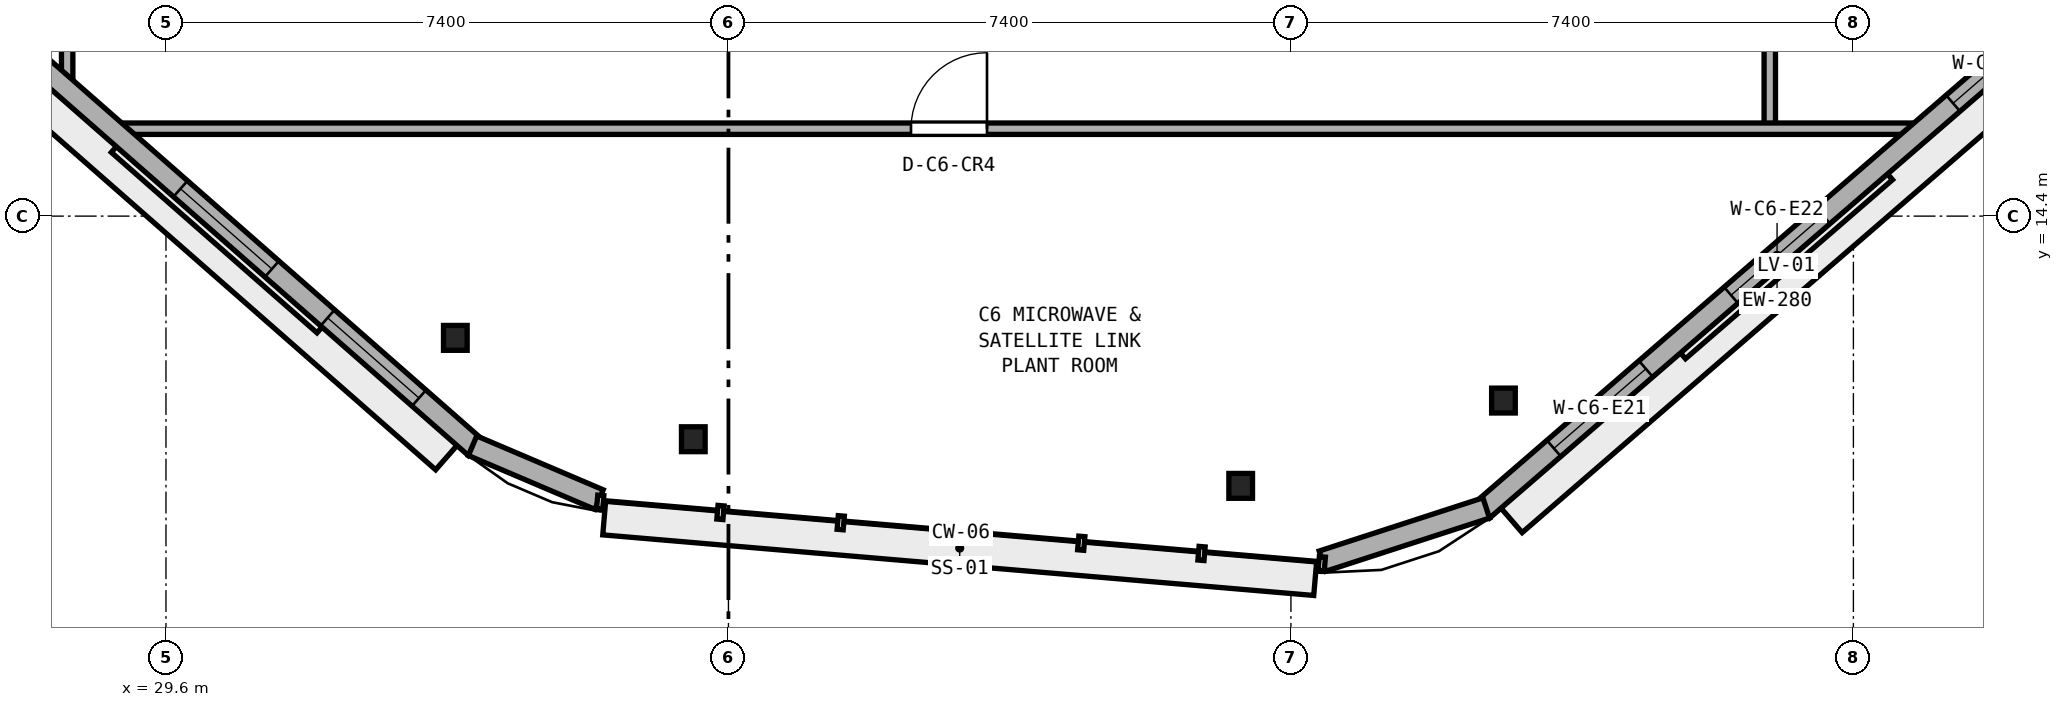
"""IFC4 building model, lengths in metres.
Left out: names, types, materials, properties, quantities, classifications, styles, units other than length and angle.
Written with IfcOpenShell. Run it as: python <this file> out.ifc"""

import sys

from ifc_helpers import new_model, si_unit, direction, frame, frame_2d, origin, origin_2d, place, context, subcontext, project, spatial, rectangle, i_section, extrude, element, fill, save


model = new_model("IFC4")
c1 = context("Model", 3, precision=1e-05, world=origin(), true_north=direction((0.0, 1.0)))
c2 = subcontext(c1, "Body", "Model", "MODEL_VIEW")
j1 = project(units=[si_unit("LENGTHUNIT", "METRE"), si_unit("PLANEANGLEUNIT", "RADIAN")], contexts=[c1])
p1 = place(None, origin())
s1 = spatial("IfcSite", under=j1, at=p1, CompositionType="ELEMENT")
p2 = place(p1, origin())
s2 = spatial("IfcBuilding", under=s1, at=p2, CompositionType="ELEMENT")
p3 = place(p2, frame((0.0, 0.0, 333.4)))
s3 = spatial("IfcBuildingStorey", under=s2, at=p3, CompositionType="ELEMENT", Elevation=333.4)
for number, where, z_axis, x_axis in (
    (1, (36.538, 11.465, 0.0), (0.0, 0.0, 1.0), (1.0, 0.0, 0.0)),
    (2, (43.739, 10.851, 0.0), (0.0, 0.0, 1.0), (1.0, 0.0, 0.0)),
    (3, (47.196, 11.973, 0.0), (0.0, 0.0, 1.0), (1.0, 0.0, 0.0)),
    (4, (33.407, 12.798, 0.0), (0.0, 0.0, 1.0), (1.0, 0.0, 0.0)),
):
    element("IfcColumn", number, at=place(p3, frame(where, z_axis=z_axis, x_axis=x_axis)), inside=s3, PredefinedType="COLUMN", context=c2, shape_type="SweptSolid", body=[
        extrude(i_section(OverallWidth=0.311, OverallDepth=0.327, WebThickness=0.016, FlangeThickness=0.025, at=origin_2d()), origin(), (0.0, 0.0, 1.0), 4.0),
    ])
p4 = place(p3, frame((50.7, 15.55, 0.0), z_axis=(0.0, 0.0, 1.0), x_axis=(0.0, 1.0, 0.0)))
e5 = element("IfcWall", 5, at=p4, inside=s3, PredefinedType="PARTITIONING", context=c2, shape_type="SweptSolid", body=[
    extrude(rectangle(XDim=19.3, YDim=0.15, at=frame_2d((9.65, 0.0))), origin(), (0.0, 0.0, 1.0), 3.7),
])
p5 = place(p4, frame((9.15, 0.0, 0.0)))
e6 = element("IfcOpeningElement", 6, at=p5, cuts=e5, PredefinedType="OPENING", context=c2, shape_type="SweptSolid", body=[
    extrude(rectangle(XDim=1.0, YDim=2.12, at=frame_2d((0.5, 1.06))), frame((0.0, 0.085, 0.0), z_axis=(0.0, -1.0, 0.0), x_axis=(1.0, 0.0, 0.0)), (0.0, 0.0, 1.0), 0.17),
])
p6 = place(p3, frame((28.3, 16.022, 0.0), z_axis=(0.0, 0.0, 1.0), x_axis=(0.0, 1.0, 0.0)))
e7 = element("IfcWall", 7, at=p6, inside=s3, PredefinedType="PARTITIONING", context=c2, shape_type="SweptSolid", body=[
    extrude(rectangle(XDim=17.933, YDim=0.15, at=frame_2d((8.967, 0.0))), origin(), (0.0, 0.0, 1.0), 3.156),
])
p7 = place(p6, frame((8.464, 0.0, 0.0)))
e8 = element("IfcOpeningElement", 8, at=p7, cuts=e7, PredefinedType="OPENING", context=c2, shape_type="SweptSolid", body=[
    extrude(rectangle(XDim=1.0, YDim=2.12, at=frame_2d((0.5, 1.06))), frame((0.0, 0.085, 0.0), z_axis=(0.0, -1.0, 0.0), x_axis=(1.0, 0.0, 0.0)), (0.0, 0.0, 1.0), 0.17),
])
p8 = place(p3, frame((28.818, 15.55, 0.0), z_axis=(0.0, 0.0, 1.0), x_axis=(1.0, 0.0, 0.0)))
e9 = element("IfcWall", 9, at=p8, inside=s3, PredefinedType="PARTITIONING", context=c2, shape_type="SweptSolid", body=[
    extrude(rectangle(XDim=23.98, YDim=0.15, at=frame_2d((11.99, 0.0))), origin(), (0.0, 0.0, 1.0), 3.7),
])
p9 = place(p8, frame((10.583, 0.0, 0.0)))
e10 = element("IfcOpeningElement", 10, at=p9, cuts=e9, PredefinedType="OPENING", context=c2, shape_type="SweptSolid", body=[
    extrude(rectangle(XDim=1.0, YDim=2.12, at=frame_2d((0.5, 1.06))), frame((0.0, 0.085, 0.0), z_axis=(0.0, -1.0, 0.0), x_axis=(1.0, 0.0, 0.0)), (0.0, 0.0, 1.0), 0.17),
])
p10 = place(p3, frame((46.921, 10.533, 0.0), z_axis=(0.0, 0.0, 1.0), x_axis=(0.756489047049, 0.654006362121, 0.0)))
e11 = element("IfcWall", 11, at=p10, inside=s3, PredefinedType="STANDARD", context=c2, shape_type="SweptSolid", body=[
    extrude(rectangle(XDim=10.244, YDim=0.28, at=frame_2d((5.122, 0.0))), origin(), (0.0, 0.0, 1.0), 3.7),
])
p11 = place(p10, frame((1.24, 0.0, 0.9)))
e12 = element("IfcOpeningElement", 12, at=p11, cuts=e11, PredefinedType="OPENING", context=c2, shape_type="SweptSolid", body=[
    extrude(rectangle(XDim=1.6, YDim=1.45, at=frame_2d((0.8, 0.725))), frame((0.0, 0.15, 0.0), z_axis=(0.0, -1.0, 0.0), x_axis=(1.0, 0.0, 0.0)), (0.0, 0.0, 1.0), 0.3),
])
p12 = place(p10, frame((4.322, 0.0, 0.9)))
e13 = element("IfcOpeningElement", 13, at=p12, cuts=e11, PredefinedType="OPENING", context=c2, shape_type="SweptSolid", body=[
    extrude(rectangle(XDim=1.6, YDim=1.45, at=frame_2d((0.8, 0.725))), frame((0.0, 0.15, 0.0), z_axis=(0.0, -1.0, 0.0), x_axis=(1.0, 0.0, 0.0)), (0.0, 0.0, 1.0), 0.3),
])
p13 = place(p10, frame((8.183, 0.0, 0.9)))
e14 = element("IfcOpeningElement", 14, at=p13, cuts=e11, PredefinedType="OPENING", context=c2, shape_type="SweptSolid", body=[
    extrude(rectangle(XDim=1.6, YDim=1.45, at=frame_2d((0.8, 0.725))), frame((0.0, 0.15, 0.0), z_axis=(0.0, -1.0, 0.0), x_axis=(1.0, 0.0, 0.0)), (0.0, 0.0, 1.0), 0.3),
])
p14 = place(p3, frame((27.114, 17.109, 0.0), z_axis=(0.0, 0.0, 1.0), x_axis=(0.751684867815, -0.659522448062, 0.0)))
e15 = element("IfcWall", 15, at=p14, inside=s3, PredefinedType="STANDARD", context=c2, shape_type="SweptSolid", body=[
    extrude(rectangle(XDim=8.723, YDim=0.28, at=frame_2d((4.362, 0.0))), origin(), (0.0, 0.0, 1.0), 3.7),
])
p15 = place(p14, frame((3.562, 0.0, 0.9)))
e16 = element("IfcOpeningElement", 16, at=p15, cuts=e15, PredefinedType="OPENING", context=c2, shape_type="SweptSolid", body=[
    extrude(rectangle(XDim=1.6, YDim=1.45, at=frame_2d((0.8, 0.725))), frame((0.0, 0.15, 0.0), z_axis=(0.0, -1.0, 0.0), x_axis=(1.0, 0.0, 0.0)), (0.0, 0.0, 1.0), 0.3),
])
p16 = place(p14, frame((6.136, 0.0, 0.9)))
e17 = element("IfcOpeningElement", 17, at=p16, cuts=e15, PredefinedType="OPENING", context=c2, shape_type="SweptSolid", body=[
    extrude(rectangle(XDim=1.6, YDim=1.45, at=frame_2d((0.8, 0.725))), frame((0.0, 0.15, 0.0), z_axis=(0.0, -1.0, 0.0), x_axis=(1.0, 0.0, 0.0)), (0.0, 0.0, 1.0), 0.3),
])
p17 = place(p3, frame((44.814, 9.861, 0.0), z_axis=(0.0, 0.0, 1.0), x_axis=(0.951121924751, 0.308815615309, 0.0)))
e18 = element("IfcWall", 18, at=p17, inside=s3, PredefinedType="STANDARD", context=c2, shape_type="SweptSolid", body=[
    extrude(rectangle(XDim=2.266, YDim=0.28, at=frame_2d((1.133, 0.0))), origin(), (0.0, 0.0, 1.0), 3.7),
])
p18 = place(p3, frame((33.634, 11.379, 0.0), z_axis=(0.0, 0.0, 1.0), x_axis=(0.920078043788, -0.391735106085, 0.0)))
e19 = element("IfcWall", 19, at=p18, inside=s3, PredefinedType="STANDARD", context=c2, shape_type="SweptSolid", body=[
    extrude(rectangle(XDim=1.809, YDim=0.28, at=frame_2d((0.904, 0.0))), origin(), (0.0, 0.0, 1.0), 3.7),
])
p19 = place(p9, origin())
e20 = element("IfcDoor", 20, at=p19, inside=s3, OperationType="SINGLE_SWING_RIGHT", PredefinedType="DOOR", context=c2, shape_type="SweptSolid", body=[
    extrude(rectangle(XDim=1.0, YDim=2.12, at=frame_2d((0.5, 1.06))), frame((0.0, 0.025, 0.0), z_axis=(0.0, -1.0, 0.0), x_axis=(1.0, 0.0, 0.0)), (0.0, 0.0, 1.0), 0.05),
])
fill(e10, e20)
p20 = place(p11, origin())
e21 = element("IfcWindow", 21, at=p20, inside=s3, PartitioningType="SINGLE_PANEL", PredefinedType="WINDOW", context=c2, shape_type="SweptSolid", body=[
    extrude(rectangle(XDim=1.6, YDim=1.45, at=frame_2d((0.8, 0.725))), frame((0.0, 0.03, 0.0), z_axis=(0.0, -1.0, 0.0), x_axis=(1.0, 0.0, 0.0)), (0.0, 0.0, 1.0), 0.06),
])
fill(e12, e21)
p21 = place(p12, origin())
e22 = element("IfcWindow", 22, at=p21, inside=s3, PartitioningType="SINGLE_PANEL", PredefinedType="WINDOW", context=c2, shape_type="SweptSolid", body=[
    extrude(rectangle(XDim=1.6, YDim=1.45, at=frame_2d((0.8, 0.725))), frame((0.0, 0.03, 0.0), z_axis=(0.0, -1.0, 0.0), x_axis=(1.0, 0.0, 0.0)), (0.0, 0.0, 1.0), 0.06),
])
fill(e13, e22)
p22 = place(p13, origin())
e23 = element("IfcWindow", 23, at=p22, inside=s3, PartitioningType="SINGLE_PANEL", PredefinedType="WINDOW", context=c2, shape_type="SweptSolid", body=[
    extrude(rectangle(XDim=1.6, YDim=1.45, at=frame_2d((0.8, 0.725))), frame((0.0, 0.03, 0.0), z_axis=(0.0, -1.0, 0.0), x_axis=(1.0, 0.0, 0.0)), (0.0, 0.0, 1.0), 0.06),
])
fill(e14, e23)
p23 = place(p15, origin())
e24 = element("IfcWindow", 24, at=p23, inside=s3, PartitioningType="SINGLE_PANEL", PredefinedType="WINDOW", context=c2, shape_type="SweptSolid", body=[
    extrude(rectangle(XDim=1.6, YDim=1.45, at=frame_2d((0.8, 0.725))), frame((0.0, 0.03, 0.0), z_axis=(0.0, -1.0, 0.0), x_axis=(1.0, 0.0, 0.0)), (0.0, 0.0, 1.0), 0.06),
])
fill(e16, e24)
p24 = place(p16, origin())
e25 = element("IfcWindow", 25, at=p24, inside=s3, PartitioningType="SINGLE_PANEL", PredefinedType="WINDOW", context=c2, shape_type="SweptSolid", body=[
    extrude(rectangle(XDim=1.6, YDim=1.45, at=frame_2d((0.8, 0.725))), frame((0.0, 0.03, 0.0), z_axis=(0.0, -1.0, 0.0), x_axis=(1.0, 0.0, 0.0)), (0.0, 0.0, 1.0), 0.06),
])
fill(e17, e25)
save(model, sys.argv[1])
